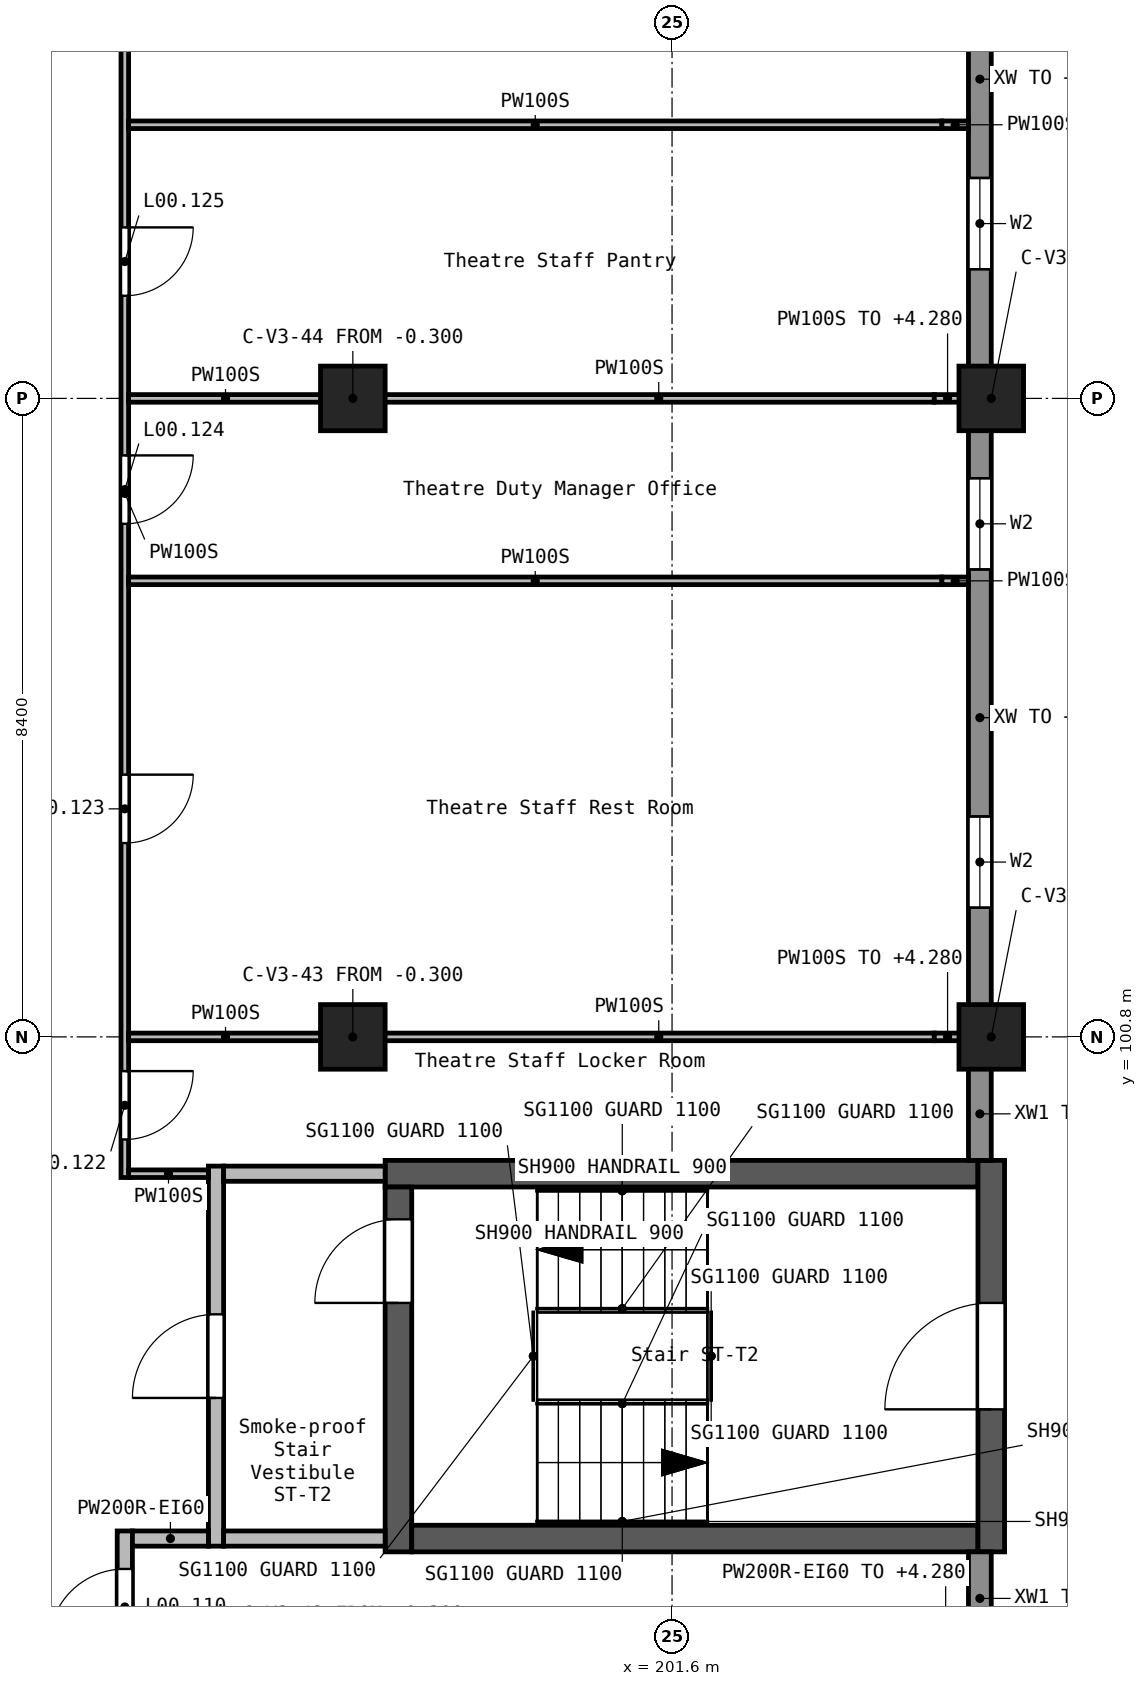
"""IFC4 building model, lengths in metres.
Left out: names, types, materials, properties, quantities, classifications, styles, units other than length and angle.
Written with IfcOpenShell. Run it as: python <this file> out.ifc"""

import sys

from ifc_helpers import new_model, si_unit, direction, frame, frame_2d, origin, origin_2d, place, context, subcontext, project, spatial, rectangle, extrude, element, fill, save


model = new_model("IFC4")
c1 = context("Model", 3, precision=1e-05, world=origin(), true_north=direction((0.0, 1.0)))
c2 = subcontext(c1, "Body", "Model", "MODEL_VIEW")
j1 = project(units=[si_unit("LENGTHUNIT", "METRE"), si_unit("PLANEANGLEUNIT", "RADIAN")], contexts=[c1])
p1 = place(None, origin())
s1 = spatial("IfcSite", under=j1, at=p1, CompositionType="ELEMENT")
p2 = place(p1, origin())
s2 = spatial("IfcBuilding", under=s1, at=p2, CompositionType="ELEMENT")
p3 = place(p2, origin())
s3 = spatial("IfcBuildingStorey", under=s2, at=p3, CompositionType="ELEMENT", Elevation=0.0)
for number, where, z_axis, x_axis in (
    (1, (197.4, 100.8, -0.3), (0.0, 0.0, 1.0), (1.0, 0.0, 0.0)),
    (2, (197.4, 109.2, -0.3), (0.0, 0.0, 1.0), (1.0, 0.0, 0.0)),
    (3, (205.8, 100.8, -0.3), (0.0, 0.0, 1.0), (1.0, 0.0, 0.0)),
    (4, (205.8, 109.2, -0.3), (0.0, 0.0, 1.0), (1.0, 0.0, 0.0)),
):
    element("IfcColumn", number, at=place(p3, frame(where, z_axis=z_axis, x_axis=x_axis)), inside=s3, PredefinedType="COLUMN", context=c2, shape_type="SweptSolid", body=[
        extrude(rectangle(XDim=0.85, YDim=0.85, at=origin_2d()), origin(), (0.0, 0.0, 1.0), 5.7),
    ])
p4 = place(p3, frame((197.825, 99.0, -0.3), z_axis=(0.0, 0.0, 1.0), x_axis=(1.0, 0.0, 0.0)))
e5 = element("IfcWall", 5, at=p4, inside=s3, PredefinedType="SHEAR", context=c2, shape_type="SweptSolid", body=[
    extrude(rectangle(XDim=7.8, YDim=0.35, at=frame_2d((3.9, 0.0))), origin(), (0.0, 0.0, 1.0), 5.7),
])
p5 = place(p3, frame((198.0, 94.025, -0.3), z_axis=(0.0, 0.0, 1.0), x_axis=(0.0, 1.0, 0.0)))
e6 = element("IfcWall", 6, at=p5, inside=s3, PredefinedType="SHEAR", context=c2, shape_type="SweptSolid", body=[
    extrude(rectangle(XDim=4.8, YDim=0.35, at=frame_2d((2.4, 0.0))), origin(), (0.0, 0.0, 1.0), 5.7),
])
p6 = place(p5, frame((3.275, 0.0, 0.3)))
e7 = element("IfcOpeningElement", 7, at=p6, cuts=e6, PredefinedType="OPENING", context=c2, shape_type="SweptSolid", body=[
    extrude(rectangle(XDim=1.1, YDim=2.1, at=frame_2d((0.55, 1.05))), frame((0.0, 0.185, 0.0), z_axis=(0.0, -1.0, 0.0), x_axis=(1.0, 0.0, 0.0)), (0.0, 0.0, 1.0), 0.37),
])
p7 = place(p3, frame((198.175, 94.2, -0.3), z_axis=(0.0, 0.0, 1.0), x_axis=(1.0, 0.0, 0.0)))
e8 = element("IfcWall", 8, at=p7, inside=s3, PredefinedType="SHEAR", context=c2, shape_type="SweptSolid", body=[
    extrude(rectangle(XDim=7.45, YDim=0.35, at=frame_2d((3.725, 0.0))), origin(), (0.0, 0.0, 1.0), 5.7),
])
p8 = place(p3, frame((205.8, 94.025, -0.3), z_axis=(0.0, 0.0, 1.0), x_axis=(0.0, 1.0, 0.0)))
e9 = element("IfcWall", 9, at=p8, inside=s3, PredefinedType="SHEAR", context=c2, shape_type="SweptSolid", body=[
    extrude(rectangle(XDim=5.15, YDim=0.35, at=frame_2d((2.575, 0.0))), origin(), (0.0, 0.0, 1.0), 5.7),
])
p9 = place(p8, frame((1.875, 0.0, 0.3)))
e10 = element("IfcOpeningElement", 10, at=p9, cuts=e9, PredefinedType="OPENING", context=c2, shape_type="SweptSolid", body=[
    extrude(rectangle(XDim=1.4, YDim=2.1, at=frame_2d((0.7, 1.05))), frame((0.0, 0.185, 0.0), z_axis=(0.0, -1.0, 0.0), x_axis=(1.0, 0.0, 0.0)), (0.0, 0.0, 1.0), 0.37),
])
for number, where, z_axis, x_axis in (
    (11, (205.65, 92.8, 0.0), (0.0, 0.0, 1.0), (0.0, 1.0, 0.0)),
    (12, (205.65, 99.175, 0.0), (0.0, 0.0, 1.0), (0.0, 1.0, 0.0)),
):
    element("IfcWall", number, at=place(p3, frame(where, z_axis=z_axis, x_axis=x_axis)), inside=s3, PredefinedType="STANDARD", context=c2, shape_type="SweptSolid", body=[
        extrude(rectangle(XDim=1.225, YDim=0.3, at=frame_2d((0.612, 0.0))), origin(), (0.0, 0.0, 1.0), 4.25),
    ])
p10 = place(p3, frame((205.65, 101.2, 0.0), z_axis=(0.0, 0.0, 1.0), x_axis=(0.0, 1.0, 0.0)))
e13 = element("IfcWall", 13, at=p10, inside=s3, PredefinedType="STANDARD", context=c2, shape_type="SweptSolid", body=[
    extrude(rectangle(XDim=7.6, YDim=0.3, at=frame_2d((3.8, 0.0))), origin(), (0.0, 0.0, 1.0), 4.25),
])
p11 = place(p10, frame((1.3, 0.0, 1.2)))
e14 = element("IfcOpeningElement", 14, at=p11, cuts=e13, PredefinedType="OPENING", context=c2, shape_type="SweptSolid", body=[
    extrude(rectangle(XDim=1.2, YDim=1.2, at=frame_2d((0.6, 0.6))), frame((0.0, 0.16, 0.0), z_axis=(0.0, -1.0, 0.0), x_axis=(1.0, 0.0, 0.0)), (0.0, 0.0, 1.0), 0.32),
])
p12 = place(p10, frame((5.75, 0.0, 1.2)))
e15 = element("IfcOpeningElement", 15, at=p12, cuts=e13, PredefinedType="OPENING", context=c2, shape_type="SweptSolid", body=[
    extrude(rectangle(XDim=1.2, YDim=1.2, at=frame_2d((0.6, 0.6))), frame((0.0, 0.16, 0.0), z_axis=(0.0, -1.0, 0.0), x_axis=(1.0, 0.0, 0.0)), (0.0, 0.0, 1.0), 0.32),
])
p13 = place(p3, frame((205.65, 109.6, 0.0), z_axis=(0.0, 0.0, 1.0), x_axis=(0.0, 1.0, 0.0)))
e16 = element("IfcWall", 16, at=p13, inside=s3, PredefinedType="STANDARD", context=c2, shape_type="SweptSolid", body=[
    extrude(rectangle(XDim=7.6, YDim=0.3, at=frame_2d((3.8, 0.0))), origin(), (0.0, 0.0, 1.0), 4.25),
])
p14 = place(p13, frame((1.3, 0.0, 1.2)))
e17 = element("IfcOpeningElement", 17, at=p14, cuts=e16, PredefinedType="OPENING", context=c2, shape_type="SweptSolid", body=[
    extrude(rectangle(XDim=1.2, YDim=1.2, at=frame_2d((0.6, 0.6))), frame((0.0, 0.16, 0.0), z_axis=(0.0, -1.0, 0.0), x_axis=(1.0, 0.0, 0.0)), (0.0, 0.0, 1.0), 0.32),
])
p15 = place(p13, frame((5.1, 0.0, 1.2)))
e18 = element("IfcOpeningElement", 18, at=p15, cuts=e16, PredefinedType="OPENING", context=c2, shape_type="SweptSolid", body=[
    extrude(rectangle(XDim=1.2, YDim=1.2, at=frame_2d((0.6, 0.6))), frame((0.0, 0.16, 0.0), z_axis=(0.0, -1.0, 0.0), x_axis=(1.0, 0.0, 0.0)), (0.0, 0.0, 1.0), 0.32),
])
p16 = place(p3, frame((194.4, 88.9, 0.0), z_axis=(0.0, 0.0, 1.0), x_axis=(0.0, 1.0, 0.0)))
e19 = element("IfcWall", 19, at=p16, inside=s3, PredefinedType="SOLIDWALL", context=c2, shape_type="SweptSolid", body=[
    extrude(rectangle(XDim=5.4, YDim=0.2, at=frame_2d((2.7, 0.0))), origin(), (0.0, 0.0, 1.0), 5.05),
])
p17 = place(p16, frame((3.9, 0.0, 0.0)))
e20 = element("IfcOpeningElement", 20, at=p17, cuts=e19, PredefinedType="OPENING", context=c2, shape_type="SweptSolid", body=[
    extrude(rectangle(XDim=1.0, YDim=2.1, at=frame_2d((0.5, 1.05))), frame((0.0, 0.11, 0.0), z_axis=(0.0, -1.0, 0.0), x_axis=(1.0, 0.0, 0.0)), (0.0, 0.0, 1.0), 0.22),
])
p18 = place(p16, frame((1.2, 0.0, 0.0)))
e21 = element("IfcOpeningElement", 21, at=p18, cuts=e19, PredefinedType="OPENING", context=c2, shape_type="SweptSolid", body=[
    extrude(rectangle(XDim=1.0, YDim=2.1, at=frame_2d((0.5, 1.05))), frame((0.0, 0.11, 0.0), z_axis=(0.0, -1.0, 0.0), x_axis=(1.0, 0.0, 0.0)), (0.0, 0.0, 1.0), 0.22),
])
p19 = place(p3, frame((195.6, 94.1, 0.0), z_axis=(0.0, 0.0, 1.0), x_axis=(0.0, 1.0, 0.0)))
e22 = element("IfcWall", 22, at=p19, inside=s3, PredefinedType="SOLIDWALL", context=c2, shape_type="SweptSolid", body=[
    extrude(rectangle(XDim=5.0, YDim=0.2, at=frame_2d((2.5, 0.0))), origin(), (0.0, 0.0, 1.0), 5.05),
])
p20 = place(p19, frame((1.95, 0.0, 0.0)))
e23 = element("IfcOpeningElement", 23, at=p20, cuts=e22, PredefinedType="OPENING", context=c2, shape_type="SweptSolid", body=[
    extrude(rectangle(XDim=1.1, YDim=2.1, at=frame_2d((0.55, 1.05))), frame((0.0, 0.11, 0.0), z_axis=(0.0, -1.0, 0.0), x_axis=(1.0, 0.0, 0.0)), (0.0, 0.0, 1.0), 0.22),
])
for number, where, z_axis, x_axis in (
    (24, (195.7, 94.2, 0.0), (0.0, 0.0, 1.0), (1.0, 0.0, 0.0)),
    (25, (195.7, 99.0, 0.0), (0.0, 0.0, 1.0), (1.0, 0.0, 0.0)),
):
    element("IfcWall", number, at=place(p3, frame(where, z_axis=z_axis, x_axis=x_axis)), inside=s3, PredefinedType="SOLIDWALL", context=c2, shape_type="SweptSolid", body=[
        extrude(rectangle(XDim=2.125, YDim=0.2, at=frame_2d((1.062, 0.0))), origin(), (0.0, 0.0, 1.0), 5.05),
    ])
p21 = place(p3, frame((194.5, 94.2, 0.0), z_axis=(0.0, 0.0, 1.0), x_axis=(1.0, 0.0, 0.0)))
e26 = element("IfcWall", 26, at=p21, inside=s3, PredefinedType="SOLIDWALL", context=c2, shape_type="SweptSolid", body=[
    extrude(rectangle(XDim=1.0, YDim=0.2, at=frame_2d((0.5, 0.0))), origin(), (0.0, 0.0, 1.0), 5.05),
])
p22 = place(p3, frame((194.4, 116.95, 0.0), z_axis=(0.0, 0.0, 1.0), x_axis=(0.0, -1.0, 0.0)))
e27 = element("IfcWall", 27, at=p22, inside=s3, PredefinedType="PARTITIONING", context=c2, shape_type="SweptSolid", body=[
    extrude(rectangle(XDim=18.0, YDim=0.1, at=frame_2d((9.0, 0.0))), origin(), (0.0, 0.0, 1.0), 5.05),
])
p23 = place(p22, frame((16.6, 0.0, 0.0)))
e28 = element("IfcOpeningElement", 28, at=p23, cuts=e27, PredefinedType="OPENING", context=c2, shape_type="SweptSolid", body=[
    extrude(rectangle(XDim=0.9, YDim=2.1, at=frame_2d((0.45, 1.05))), frame((0.0, 0.06, 0.0), z_axis=(0.0, -1.0, 0.0), x_axis=(1.0, 0.0, 0.0)), (0.0, 0.0, 1.0), 0.12),
])
p24 = place(p22, frame((12.7, 0.0, 0.0)))
e29 = element("IfcOpeningElement", 29, at=p24, cuts=e27, PredefinedType="OPENING", context=c2, shape_type="SweptSolid", body=[
    extrude(rectangle(XDim=0.9, YDim=2.1, at=frame_2d((0.45, 1.05))), frame((0.0, 0.06, 0.0), z_axis=(0.0, -1.0, 0.0), x_axis=(1.0, 0.0, 0.0)), (0.0, 0.0, 1.0), 0.12),
])
p25 = place(p22, frame((8.5, 0.0, 0.0)))
e30 = element("IfcOpeningElement", 30, at=p25, cuts=e27, PredefinedType="OPENING", context=c2, shape_type="SweptSolid", body=[
    extrude(rectangle(XDim=0.9, YDim=2.1, at=frame_2d((0.45, 1.05))), frame((0.0, 0.06, 0.0), z_axis=(0.0, -1.0, 0.0), x_axis=(1.0, 0.0, 0.0)), (0.0, 0.0, 1.0), 0.12),
])
p26 = place(p22, frame((5.5, 0.0, 0.0)))
e31 = element("IfcOpeningElement", 31, at=p26, cuts=e27, PredefinedType="OPENING", context=c2, shape_type="SweptSolid", body=[
    extrude(rectangle(XDim=0.9, YDim=2.1, at=frame_2d((0.45, 1.05))), frame((0.0, 0.06, 0.0), z_axis=(0.0, -1.0, 0.0), x_axis=(1.0, 0.0, 0.0)), (0.0, 0.0, 1.0), 0.12),
])
p27 = place(p22, frame((1.3, 0.0, 0.0)))
e32 = element("IfcOpeningElement", 32, at=p27, cuts=e27, PredefinedType="OPENING", context=c2, shape_type="SweptSolid", body=[
    extrude(rectangle(XDim=0.9, YDim=2.1, at=frame_2d((0.45, 1.05))), frame((0.0, 0.06, 0.0), z_axis=(0.0, -1.0, 0.0), x_axis=(1.0, 0.0, 0.0)), (0.0, 0.0, 1.0), 0.12),
])
p28 = place(p3, frame((194.45, 100.8, 0.0), z_axis=(0.0, 0.0, 1.0), x_axis=(1.0, 0.0, 0.0)))
e33 = element("IfcWall", 33, at=p28, inside=s3, PredefinedType="PARTITIONING", context=c2, shape_type="SweptSolid", body=[
    extrude(rectangle(XDim=2.55, YDim=0.1, at=frame_2d((1.275, 0.0))), origin(), (0.0, 0.0, 1.0), 5.05),
])
p29 = place(p3, frame((197.8, 100.8, 0.0), z_axis=(0.0, 0.0, 1.0), x_axis=(1.0, 0.0, 0.0)))
e34 = element("IfcWall", 34, at=p29, inside=s3, PredefinedType="PARTITIONING", context=c2, shape_type="SweptSolid", body=[
    extrude(rectangle(XDim=7.25, YDim=0.1, at=frame_2d((3.625, 0.0))), origin(), (0.0, 0.0, 1.0), 5.05),
])
p30 = place(p3, frame((205.05, 100.8, 0.0), z_axis=(0.0, 0.0, 1.0), x_axis=(1.0, 0.0, 0.0)))
e35 = element("IfcWall", 35, at=p30, inside=s3, PredefinedType="PARTITIONING", context=c2, shape_type="SweptSolid", body=[
    extrude(rectangle(XDim=0.35, YDim=0.1, at=frame_2d((0.175, 0.0))), origin(), (0.0, 0.0, 1.0), 4.28),
])
p31 = place(p3, frame((194.45, 106.8, 0.0), z_axis=(0.0, 0.0, 1.0), x_axis=(1.0, 0.0, 0.0)))
e36 = element("IfcWall", 36, at=p31, inside=s3, PredefinedType="PARTITIONING", context=c2, shape_type="SweptSolid", body=[
    extrude(rectangle(XDim=10.7, YDim=0.1, at=frame_2d((5.35, 0.0))), origin(), (0.0, 0.0, 1.0), 5.05),
])
p32 = place(p3, frame((205.15, 106.8, 0.0), z_axis=(0.0, 0.0, 1.0), x_axis=(1.0, 0.0, 0.0)))
e37 = element("IfcWall", 37, at=p32, inside=s3, PredefinedType="PARTITIONING", context=c2, shape_type="SweptSolid", body=[
    extrude(rectangle(XDim=0.35, YDim=0.1, at=frame_2d((0.175, 0.0))), origin(), (0.0, 0.0, 1.0), 4.28),
])
p33 = place(p3, frame((194.45, 109.2, 0.0), z_axis=(0.0, 0.0, 1.0), x_axis=(1.0, 0.0, 0.0)))
e38 = element("IfcWall", 38, at=p33, inside=s3, PredefinedType="PARTITIONING", context=c2, shape_type="SweptSolid", body=[
    extrude(rectangle(XDim=2.55, YDim=0.1, at=frame_2d((1.275, 0.0))), origin(), (0.0, 0.0, 1.0), 5.05),
])
p34 = place(p3, frame((197.8, 109.2, 0.0), z_axis=(0.0, 0.0, 1.0), x_axis=(1.0, 0.0, 0.0)))
e39 = element("IfcWall", 39, at=p34, inside=s3, PredefinedType="PARTITIONING", context=c2, shape_type="SweptSolid", body=[
    extrude(rectangle(XDim=7.25, YDim=0.1, at=frame_2d((3.625, 0.0))), origin(), (0.0, 0.0, 1.0), 5.05),
])
p35 = place(p3, frame((205.05, 109.2, 0.0), z_axis=(0.0, 0.0, 1.0), x_axis=(1.0, 0.0, 0.0)))
e40 = element("IfcWall", 40, at=p35, inside=s3, PredefinedType="PARTITIONING", context=c2, shape_type="SweptSolid", body=[
    extrude(rectangle(XDim=0.35, YDim=0.1, at=frame_2d((0.175, 0.0))), origin(), (0.0, 0.0, 1.0), 4.28),
])
p36 = place(p3, frame((194.45, 112.8, 0.0), z_axis=(0.0, 0.0, 1.0), x_axis=(1.0, 0.0, 0.0)))
e41 = element("IfcWall", 41, at=p36, inside=s3, PredefinedType="PARTITIONING", context=c2, shape_type="SweptSolid", body=[
    extrude(rectangle(XDim=10.7, YDim=0.1, at=frame_2d((5.35, 0.0))), origin(), (0.0, 0.0, 1.0), 5.05),
])
p37 = place(p3, frame((205.15, 112.8, 0.0), z_axis=(0.0, 0.0, 1.0), x_axis=(1.0, 0.0, 0.0)))
e42 = element("IfcWall", 42, at=p37, inside=s3, PredefinedType="PARTITIONING", context=c2, shape_type="SweptSolid", body=[
    extrude(rectangle(XDim=0.35, YDim=0.1, at=frame_2d((0.175, 0.0))), origin(), (0.0, 0.0, 1.0), 4.28),
])
p38 = place(p3, frame((194.45, 99.0, 0.0), z_axis=(0.0, 0.0, 1.0), x_axis=(1.0, 0.0, 0.0)))
e43 = element("IfcWall", 43, at=p38, inside=s3, PredefinedType="PARTITIONING", context=c2, shape_type="SweptSolid", body=[
    extrude(rectangle(XDim=1.05, YDim=0.1, at=frame_2d((0.525, 0.0))), origin(), (0.0, 0.0, 1.0), 5.05),
])
p39 = place(p9, frame((1.4, 0.0, 0.0), z_axis=(0.0, 0.0, 1.0), x_axis=(-1.0, 0.0, 0.0)))
e44 = element("IfcDoor", 44, at=p39, inside=s3, OperationType="SINGLE_SWING_LEFT", PredefinedType="DOOR", context=c2, shape_type="SweptSolid", body=[
    extrude(rectangle(XDim=1.4, YDim=2.1, at=frame_2d((0.7, 1.05))), frame((0.0, 0.025, 0.0), z_axis=(0.0, -1.0, 0.0), x_axis=(1.0, 0.0, 0.0)), (0.0, 0.0, 1.0), 0.05),
])
fill(e10, e44)
p40 = place(p11, origin())
e45 = element("IfcWindow", 45, at=p40, inside=s3, PartitioningType="SINGLE_PANEL", PredefinedType="WINDOW", context=c2, shape_type="SweptSolid", body=[
    extrude(rectangle(XDim=1.2, YDim=1.2, at=frame_2d((0.6, 0.6))), frame((0.0, 0.03, 0.0), z_axis=(0.0, -1.0, 0.0), x_axis=(1.0, 0.0, 0.0)), (0.0, 0.0, 1.0), 0.06),
])
fill(e14, e45)
p41 = place(p12, origin())
e46 = element("IfcWindow", 46, at=p41, inside=s3, PartitioningType="SINGLE_PANEL", PredefinedType="WINDOW", context=c2, shape_type="SweptSolid", body=[
    extrude(rectangle(XDim=1.2, YDim=1.2, at=frame_2d((0.6, 0.6))), frame((0.0, 0.03, 0.0), z_axis=(0.0, -1.0, 0.0), x_axis=(1.0, 0.0, 0.0)), (0.0, 0.0, 1.0), 0.06),
])
fill(e15, e46)
p42 = place(p14, origin())
e47 = element("IfcWindow", 47, at=p42, inside=s3, PartitioningType="SINGLE_PANEL", PredefinedType="WINDOW", context=c2, shape_type="SweptSolid", body=[
    extrude(rectangle(XDim=1.2, YDim=1.2, at=frame_2d((0.6, 0.6))), frame((0.0, 0.03, 0.0), z_axis=(0.0, -1.0, 0.0), x_axis=(1.0, 0.0, 0.0)), (0.0, 0.0, 1.0), 0.06),
])
fill(e17, e47)
p43 = place(p6, frame((1.1, 0.0, 0.0), z_axis=(0.0, 0.0, 1.0), x_axis=(-1.0, 0.0, 0.0)))
e48 = element("IfcDoor", 48, at=p43, inside=s3, OperationType="SINGLE_SWING_LEFT", PredefinedType="DOOR", context=c2, shape_type="SweptSolid", body=[
    extrude(rectangle(XDim=1.1, YDim=2.1, at=frame_2d((0.55, 1.05))), frame((0.0, 0.025, 0.0), z_axis=(0.0, -1.0, 0.0), x_axis=(1.0, 0.0, 0.0)), (0.0, 0.0, 1.0), 0.05),
])
fill(e7, e48)
p44 = place(p20, frame((1.1, 0.0, 0.0), z_axis=(0.0, 0.0, 1.0), x_axis=(-1.0, 0.0, 0.0)))
e49 = element("IfcDoor", 49, at=p44, inside=s3, OperationType="SINGLE_SWING_RIGHT", PredefinedType="DOOR", context=c2, shape_type="SweptSolid", body=[
    extrude(rectangle(XDim=1.1, YDim=2.1, at=frame_2d((0.55, 1.05))), frame((0.0, 0.025, 0.0), z_axis=(0.0, -1.0, 0.0), x_axis=(1.0, 0.0, 0.0)), (0.0, 0.0, 1.0), 0.05),
])
fill(e23, e49)
p45 = place(p17, frame((1.0, 0.0, 0.0), z_axis=(0.0, 0.0, 1.0), x_axis=(-1.0, 0.0, 0.0)))
e50 = element("IfcDoor", 50, at=p45, inside=s3, OperationType="SINGLE_SWING_LEFT", PredefinedType="DOOR", context=c2, shape_type="SweptSolid", body=[
    extrude(rectangle(XDim=1.0, YDim=2.1, at=frame_2d((0.5, 1.05))), frame((0.0, 0.025, 0.0), z_axis=(0.0, -1.0, 0.0), x_axis=(1.0, 0.0, 0.0)), (0.0, 0.0, 1.0), 0.05),
])
fill(e20, e50)
p46 = place(p23, origin())
e51 = element("IfcDoor", 51, at=p46, inside=s3, OperationType="SINGLE_SWING_RIGHT", PredefinedType="DOOR", context=c2, shape_type="SweptSolid", body=[
    extrude(rectangle(XDim=0.9, YDim=2.1, at=frame_2d((0.45, 1.05))), frame((0.0, 0.025, 0.0), z_axis=(0.0, -1.0, 0.0), x_axis=(1.0, 0.0, 0.0)), (0.0, 0.0, 1.0), 0.05),
])
fill(e28, e51)
p47 = place(p24, origin())
e52 = element("IfcDoor", 52, at=p47, inside=s3, OperationType="SINGLE_SWING_RIGHT", PredefinedType="DOOR", context=c2, shape_type="SweptSolid", body=[
    extrude(rectangle(XDim=0.9, YDim=2.1, at=frame_2d((0.45, 1.05))), frame((0.0, 0.025, 0.0), z_axis=(0.0, -1.0, 0.0), x_axis=(1.0, 0.0, 0.0)), (0.0, 0.0, 1.0), 0.05),
])
fill(e29, e52)
p48 = place(p25, origin())
e53 = element("IfcDoor", 53, at=p48, inside=s3, OperationType="SINGLE_SWING_LEFT", PredefinedType="DOOR", context=c2, shape_type="SweptSolid", body=[
    extrude(rectangle(XDim=0.9, YDim=2.1, at=frame_2d((0.45, 1.05))), frame((0.0, 0.025, 0.0), z_axis=(0.0, -1.0, 0.0), x_axis=(1.0, 0.0, 0.0)), (0.0, 0.0, 1.0), 0.05),
])
fill(e30, e53)
p49 = place(p26, origin())
e54 = element("IfcDoor", 54, at=p49, inside=s3, OperationType="SINGLE_SWING_LEFT", PredefinedType="DOOR", context=c2, shape_type="SweptSolid", body=[
    extrude(rectangle(XDim=0.9, YDim=2.1, at=frame_2d((0.45, 1.05))), frame((0.0, 0.025, 0.0), z_axis=(0.0, -1.0, 0.0), x_axis=(1.0, 0.0, 0.0)), (0.0, 0.0, 1.0), 0.05),
])
fill(e31, e54)
save(model, sys.argv[1])
